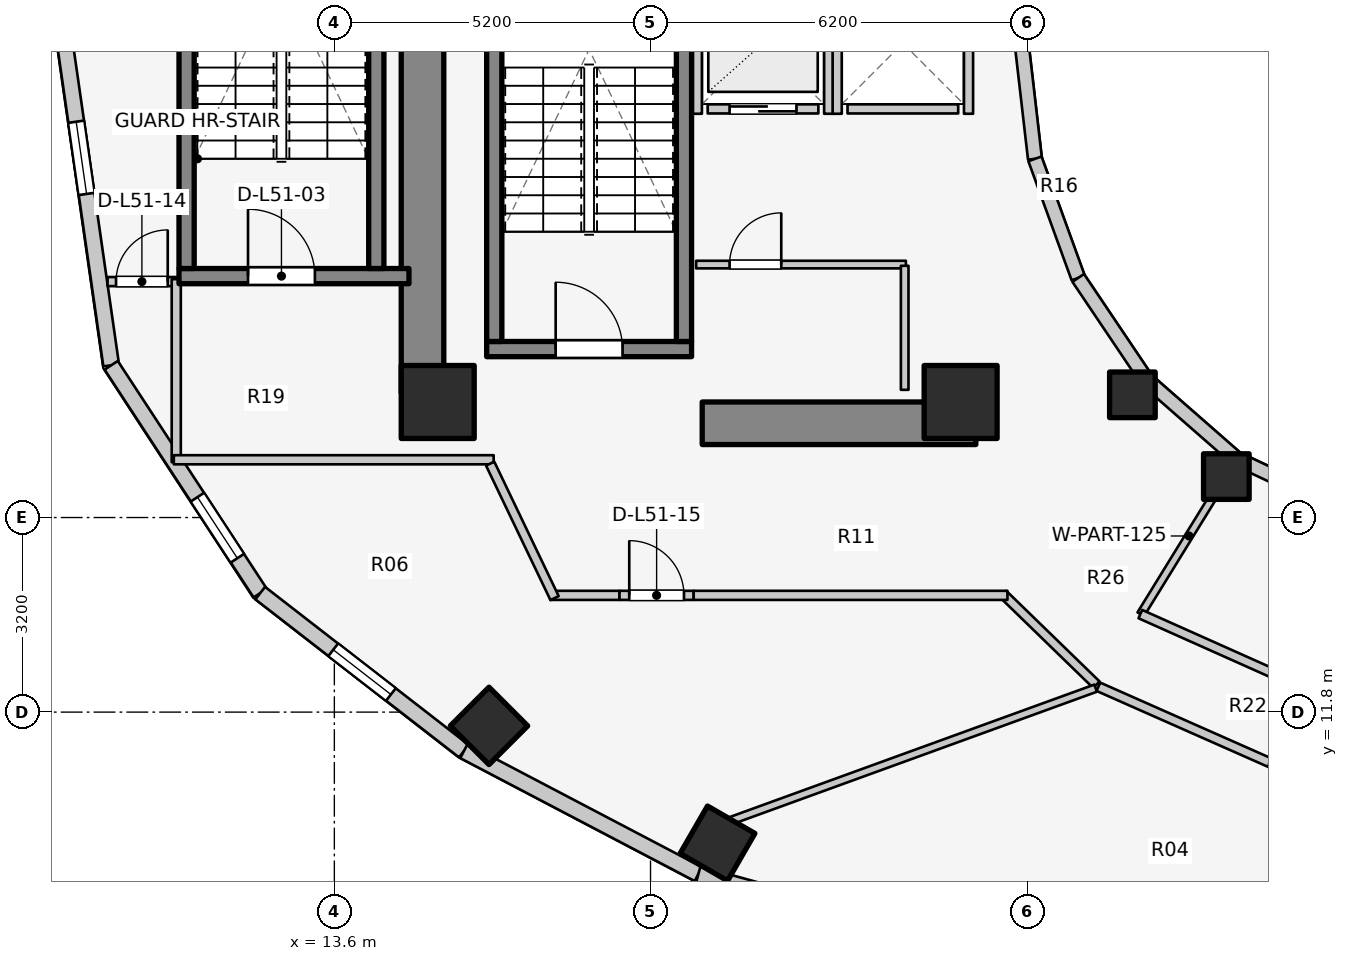
"""IFC4 building model, lengths in metres.
Left out: names, types, materials, properties, quantities, classifications, styles, units other than length and angle.
Written with IfcOpenShell. Run it as: python <this file> out.ifc"""

import sys

from ifc_helpers import new_model, si_unit, direction, frame, frame_2d, origin, origin_2d, place, context, subcontext, project, spatial, rectangle, extrude, element, fill, save


model = new_model("IFC4")
c1 = context("Model", 3, precision=1e-05, world=origin(), true_north=direction((0.0, 1.0)))
c2 = subcontext(c1, "Body", "Model", "MODEL_VIEW")
j1 = project(units=[si_unit("LENGTHUNIT", "METRE"), si_unit("PLANEANGLEUNIT", "RADIAN")], contexts=[c1])
p1 = place(None, origin())
s1 = spatial("IfcSite", under=j1, at=p1, CompositionType="ELEMENT")
p2 = place(p1, origin())
s2 = spatial("IfcBuilding", under=s1, at=p2, CompositionType="ELEMENT")
p3 = place(p2, frame((0.0, 0.0, 168.4)))
s3 = spatial("IfcBuildingStorey", under=s2, at=p3, CompositionType="ELEMENT", Elevation=168.4)
p4 = place(p3, frame((15.05, 17.05, 0.0), z_axis=(0.0, 0.0, 1.0), x_axis=(0.0, 1.0, 0.0)))
e1 = element("IfcWall", 1, at=p4, inside=s3, PredefinedType="SHEAR", context=c2, shape_type="SweptSolid", body=[
    extrude(rectangle(XDim=12.8, YDim=0.7, at=frame_2d((6.4, 0.0))), origin(), (0.0, 0.0, 1.0), 3.1),
])
p5 = place(p3, frame((19.65, 16.55, 0.0), z_axis=(0.0, 0.0, 1.0), x_axis=(1.0, 0.0, 0.0)))
e2 = element("IfcWall", 2, at=p5, inside=s3, PredefinedType="SHEAR", context=c2, shape_type="SweptSolid", body=[
    extrude(rectangle(XDim=4.5, YDim=0.7, at=frame_2d((2.25, 0.0))), origin(), (0.0, 0.0, 1.0), 3.1),
])
p6 = place(p3, frame((16.105, 17.77, 0.0), z_axis=(0.0, 0.0, 1.0), x_axis=(1.0, 0.0, 0.0)))
e3 = element("IfcWall", 3, at=p6, inside=s3, PredefinedType="SOLIDWALL", context=c2, shape_type="SweptSolid", body=[
    extrude(rectangle(XDim=3.37, YDim=0.25, at=frame_2d((1.685, 0.0))), origin(), (0.0, 0.0, 1.0), 3.1),
])
p7 = place(p6, frame((1.135, 0.0, 0.0)))
e4 = element("IfcOpeningElement", 4, at=p7, cuts=e3, PredefinedType="OPENING", context=c2, shape_type="SweptSolid", body=[
    extrude(rectangle(XDim=1.1, YDim=2.1, at=frame_2d((0.55, 1.05))), frame((0.0, 0.135, 0.0), z_axis=(0.0, -1.0, 0.0), x_axis=(1.0, 0.0, 0.0)), (0.0, 0.0, 1.0), 0.27),
])
for number, where, z_axis, x_axis in (
    (5, (16.23, 17.895, 0.0), (0.0, 0.0, 1.0), (0.0, 1.0, 0.0)),
    (6, (19.35, 17.895, 0.0), (0.0, 0.0, 1.0), (0.0, 1.0, 0.0)),
):
    element("IfcWall", number, at=place(p3, frame(where, z_axis=z_axis, x_axis=x_axis)), inside=s3, PredefinedType="SOLIDWALL", context=c2, shape_type="SweptSolid", body=[
        extrude(rectangle(XDim=7.81, YDim=0.25, at=frame_2d((3.905, 0.0))), origin(), (0.0, 0.0, 1.0), 3.1),
    ])
p8 = place(p3, frame((11.045, 18.97, 0.0), z_axis=(0.0, 0.0, 1.0), x_axis=(1.0, 0.0, 0.0)))
e7 = element("IfcWall", 7, at=p8, inside=s3, PredefinedType="SOLIDWALL", context=c2, shape_type="SweptSolid", body=[
    extrude(rectangle(XDim=3.782, YDim=0.25, at=frame_2d((1.891, 0.0))), origin(), (0.0, 0.0, 1.0), 3.1),
])
p9 = place(p8, frame((1.135, 0.0, 0.0)))
e8 = element("IfcOpeningElement", 8, at=p9, cuts=e7, PredefinedType="OPENING", context=c2, shape_type="SweptSolid", body=[
    extrude(rectangle(XDim=1.1, YDim=2.1, at=frame_2d((0.55, 1.05))), frame((0.0, 0.135, 0.0), z_axis=(0.0, -1.0, 0.0), x_axis=(1.0, 0.0, 0.0)), (0.0, 0.0, 1.0), 0.27),
])
for number, where, z_axis, x_axis in (
    (9, (11.17, 19.095, 0.0), (0.0, 0.0, 1.0), (0.0, 1.0, 0.0)),
    (10, (14.29, 19.095, 0.0), (0.0, 0.0, 1.0), (0.0, 1.0, 0.0)),
):
    element("IfcWall", number, at=place(p3, frame(where, z_axis=z_axis, x_axis=x_axis)), inside=s3, PredefinedType="SOLIDWALL", context=c2, shape_type="SweptSolid", body=[
        extrude(rectangle(XDim=7.81, YDim=0.25, at=frame_2d((3.905, 0.0))), origin(), (0.0, 0.0, 1.0), 3.1),
    ])
for number, where, z_axis, x_axis in (
    (11, (15.3, 16.9, 0.0), (0.0, 0.0, 1.0), (1.0, 0.0, 0.0)),
    (12, (23.9, 16.9, 0.0), (0.0, 0.0, 1.0), (1.0, 0.0, 0.0)),
):
    element("IfcColumn", number, at=place(p3, frame(where, z_axis=z_axis, x_axis=x_axis)), inside=s3, PredefinedType="COLUMN", context=c2, shape_type="SweptSolid", body=[
        extrude(rectangle(XDim=1.2, YDim=1.2, at=origin_2d()), origin(), (0.0, 0.0, 1.0), 3.1),
    ])
p10 = place(p3, frame((26.725, 17.018, 0.0), z_axis=(0.0, 0.0, 1.0), x_axis=(1.0, 0.0, 0.0)))
e13 = element("IfcColumn", 13, at=p10, inside=s3, PredefinedType="COLUMN", context=c2, shape_type="SweptSolid", body=[
    extrude(rectangle(XDim=0.75, YDim=0.75, at=origin_2d()), origin(), (0.0, 0.0, 1.0), 3.1),
])
p11 = place(p3, frame((16.143, 11.573, 0.0), z_axis=(0.0, 0.0, 1.0), x_axis=(-0.707106781187, -0.707106781187, 0.0)))
e14 = element("IfcColumn", 14, at=p11, inside=s3, PredefinedType="COLUMN", context=c2, shape_type="SweptSolid", body=[
    extrude(rectangle(XDim=0.9, YDim=0.9, at=origin_2d()), origin(), (0.0, 0.0, 1.0), 3.1),
])
p12 = place(p3, frame((28.27, 15.673, 0.0), z_axis=(0.0, 0.0, 1.0), x_axis=(1.0, 0.0, 0.0)))
e15 = element("IfcColumn", 15, at=p12, inside=s3, PredefinedType="COLUMN", context=c2, shape_type="SweptSolid", body=[
    extrude(rectangle(XDim=0.75, YDim=0.75, at=origin_2d()), origin(), (0.0, 0.0, 1.0), 3.1),
])
p13 = place(p3, frame((19.902, 9.641, 0.0), z_axis=(0.0, 0.0, 1.0), x_axis=(-0.5, -0.866025403784, 0.0)))
e16 = element("IfcColumn", 16, at=p13, inside=s3, PredefinedType="COLUMN", context=c2, shape_type="SweptSolid", body=[
    extrude(rectangle(XDim=0.9, YDim=0.9, at=origin_2d()), origin(), (0.0, 0.0, 1.0), 3.1),
])
p14 = place(p3, frame((24.88, 23.0, 0.0), z_axis=(0.0, 0.0, 1.0), x_axis=(0.114711713601, -0.993398823617, 0.0)))
e17 = element("IfcWall", 17, at=p14, inside=s3, PredefinedType="STANDARD", context=c2, shape_type="SweptSolid", body=[
    extrude(rectangle(XDim=2.115, YDim=0.23, at=frame_2d((1.058, 0.0))), origin(), (0.0, 0.0, 1.0), 2.56),
])
p15 = place(p3, frame((25.123, 20.898, 0.0), z_axis=(0.0, 0.0, 1.0), x_axis=(0.341423187295, -0.93990968033, 0.0)))
e18 = element("IfcWall", 18, at=p15, inside=s3, PredefinedType="STANDARD", context=c2, shape_type="SweptSolid", body=[
    extrude(rectangle(XDim=2.084, YDim=0.23, at=frame_2d((1.042, 0.0))), origin(), (0.0, 0.0, 1.0), 2.56),
])
p16 = place(p3, frame((25.834, 18.94, 0.0), z_axis=(0.0, 0.0, 1.0), x_axis=(0.558197800898, -0.829707909492, 0.0)))
e19 = element("IfcWall", 19, at=p16, inside=s3, PredefinedType="STANDARD", context=c2, shape_type="SweptSolid", body=[
    extrude(rectangle(XDim=2.027, YDim=0.23, at=frame_2d((1.013, 0.0))), origin(), (0.0, 0.0, 1.0), 1.22),
])
p17 = place(p3, frame((26.965, 17.258, 0.0), z_axis=(0.0, 0.0, 1.0), x_axis=(0.752576694707, -0.658504607869, 0.0)))
e20 = element("IfcWall", 20, at=p17, inside=s3, PredefinedType="STANDARD", context=c2, shape_type="SweptSolid", body=[
    extrude(rectangle(XDim=1.959, YDim=0.23, at=frame_2d((0.98, 0.0))), origin(), (0.0, 0.0, 1.0), 1.22),
])
p18 = place(p3, frame((28.44, 15.968, 0.0), z_axis=(0.0, 0.0, 1.0), x_axis=(0.904179699603, -0.427152280606, 0.0)))
e21 = element("IfcWall", 21, at=p18, inside=s3, PredefinedType="STANDARD", context=c2, shape_type="SweptSolid", body=[
    extrude(rectangle(XDim=1.899, YDim=0.23, at=frame_2d((0.95, 0.0))), origin(), (0.0, 0.0, 1.0), 1.22),
])
p19 = place(p3, frame((9.14, 23.0, 0.0), z_axis=(0.0, 0.0, 1.0), x_axis=(0.142227632286, -0.989833976288, 0.0)))
e22 = element("IfcWall", 22, at=p19, inside=s3, PredefinedType="STANDARD", context=c2, shape_type="SweptSolid", body=[
    extrude(rectangle(XDim=5.553, YDim=0.26, at=frame_2d((2.776, 0.0))), origin(), (0.0, 0.0, 1.0), 2.57),
])
p20 = place(p19, frame((1.506, 0.0, 0.75)))
e23 = element("IfcOpeningElement", 23, at=p20, cuts=e22, PredefinedType="OPENING", context=c2, shape_type="SweptSolid", body=[
    extrude(rectangle(XDim=1.2, YDim=1.5, at=frame_2d((0.6, 0.75))), frame((0.0, 0.14, 0.0), z_axis=(0.0, -1.0, 0.0), x_axis=(1.0, 0.0, 0.0)), (0.0, 0.0, 1.0), 0.28),
])
p21 = place(p3, frame((9.93, 17.503, 0.0), z_axis=(0.0, 0.0, 1.0), x_axis=(0.547456494366, -0.836834145322, 0.0)))
e24 = element("IfcWall", 24, at=p21, inside=s3, PredefinedType="STANDARD", context=c2, shape_type="SweptSolid", body=[
    extrude(rectangle(XDim=4.477, YDim=0.26, at=frame_2d((2.239, 0.0))), origin(), (0.0, 0.0, 1.0), 1.22),
])
p22 = place(p21, frame((2.591, 0.0, 0.15)))
e25 = element("IfcOpeningElement", 25, at=p22, cuts=e24, PredefinedType="OPENING", context=c2, shape_type="SweptSolid", body=[
    extrude(rectangle(XDim=1.2, YDim=0.9, at=frame_2d((0.6, 0.45))), frame((0.0, 0.14, 0.0), z_axis=(0.0, -1.0, 0.0), x_axis=(1.0, 0.0, 0.0)), (0.0, 0.0, 1.0), 0.28),
])
p23 = place(p3, frame((12.381, 13.757, 0.0), z_axis=(0.0, 0.0, 1.0), x_axis=(0.790185650662, -0.612867552973, 0.0)))
e26 = element("IfcWall", 26, at=p23, inside=s3, PredefinedType="STANDARD", context=c2, shape_type="SweptSolid", body=[
    extrude(rectangle(XDim=4.239, YDim=0.26, at=frame_2d((2.12, 0.0))), origin(), (0.0, 0.0, 1.0), 1.22),
])
p24 = place(p23, frame((1.52, 0.0, 0.15)))
e27 = element("IfcOpeningElement", 27, at=p24, cuts=e26, PredefinedType="OPENING", context=c2, shape_type="SweptSolid", body=[
    extrude(rectangle(XDim=1.2, YDim=0.9, at=frame_2d((0.6, 0.45))), frame((0.0, 0.14, 0.0), z_axis=(0.0, -1.0, 0.0), x_axis=(1.0, 0.0, 0.0)), (0.0, 0.0, 1.0), 0.28),
])
p25 = place(p3, frame((15.731, 11.158, 0.0), z_axis=(0.0, 0.0, 1.0), x_axis=(0.885660265226, -0.464333818065, 0.0)))
e28 = element("IfcWall", 28, at=p25, inside=s3, PredefinedType="STANDARD", context=c2, shape_type="SweptSolid", body=[
    extrude(rectangle(XDim=4.354, YDim=0.26, at=frame_2d((2.177, 0.0))), origin(), (0.0, 0.0, 1.0), 1.22),
])
p26 = place(p3, frame((19.587, 9.137, 0.0), z_axis=(0.0, 0.0, 1.0), x_axis=(0.963953455704, -0.26607092144, 0.0)))
e29 = element("IfcWall", 29, at=p26, inside=s3, PredefinedType="STANDARD", context=c2, shape_type="SweptSolid", body=[
    extrude(rectangle(XDim=5.237, YDim=0.26, at=frame_2d((2.618, 0.0))), origin(), (0.0, 0.0, 1.0), 1.22),
])
p27 = place(p26, frame((2.018, 0.0, 0.15)))
e30 = element("IfcOpeningElement", 30, at=p27, cuts=e29, PredefinedType="OPENING", context=c2, shape_type="SweptSolid", body=[
    extrude(rectangle(XDim=1.2, YDim=0.9, at=frame_2d((0.6, 0.45))), frame((0.0, 0.14, 0.0), z_axis=(0.0, -1.0, 0.0), x_axis=(1.0, 0.0, 0.0)), (0.0, 0.0, 1.0), 0.28),
])
p28 = place(p3, frame((19.74, 21.72, 0.0), z_axis=(0.0, 0.0, 1.0), x_axis=(1.0, 0.0, 0.0)))
e31 = element("IfcWall", 31, at=p28, inside=s3, PredefinedType="SOLIDWALL", context=c2, shape_type="SweptSolid", body=[
    extrude(rectangle(XDim=1.82, YDim=0.15, at=frame_2d((0.91, 0.0))), origin(), (0.0, 0.0, 1.0), 2.575),
])
p29 = place(p28, frame((0.36, 0.0, 0.0)))
e32 = element("IfcOpeningElement", 32, at=p29, cuts=e31, PredefinedType="OPENING", context=c2, shape_type="SweptSolid", body=[
    extrude(rectangle(XDim=1.1, YDim=2.1, at=frame_2d((0.55, 1.05))), frame((0.0, 0.085, 0.0), z_axis=(0.0, -1.0, 0.0), x_axis=(1.0, 0.0, 0.0)), (0.0, 0.0, 1.0), 0.17),
])
for number, where, z_axis, x_axis in (
    (33, (19.57, 21.64, 0.0), (0.0, 0.0, 1.0), (0.0, 1.0, 0.0)),
    (34, (21.73, 21.64, 0.0), (0.0, 0.0, 1.0), (0.0, 1.0, 0.0)),
):
    element("IfcWall", number, at=place(p3, frame(where, z_axis=z_axis, x_axis=x_axis)), inside=s3, PredefinedType="SOLIDWALL", context=c2, shape_type="SweptSolid", body=[
        extrude(rectangle(XDim=2.32, YDim=0.15, at=frame_2d((1.16, 0.0))), origin(), (0.0, 0.0, 1.0), 2.575),
    ])
p30 = place(p3, frame((22.04, 21.72, 0.0), z_axis=(0.0, 0.0, 1.0), x_axis=(1.0, 0.0, 0.0)))
e35 = element("IfcWall", 35, at=p30, inside=s3, PredefinedType="SOLIDWALL", context=c2, shape_type="SweptSolid", body=[
    extrude(rectangle(XDim=1.82, YDim=0.15, at=frame_2d((0.91, 0.0))), origin(), (0.0, 0.0, 1.0), 2.12),
])
p31 = place(p3, frame((21.87, 21.64, 0.0), z_axis=(0.0, 0.0, 1.0), x_axis=(0.0, 1.0, 0.0)))
e36 = element("IfcWall", 36, at=p31, inside=s3, PredefinedType="SOLIDWALL", context=c2, shape_type="SweptSolid", body=[
    extrude(rectangle(XDim=2.32, YDim=0.15, at=frame_2d((1.16, 0.0))), origin(), (0.0, 0.0, 1.0), 2.575),
])
p32 = place(p3, frame((24.03, 21.64, 0.0), z_axis=(0.0, 0.0, 1.0), x_axis=(0.0, 1.0, 0.0)))
e37 = element("IfcWall", 37, at=p32, inside=s3, PredefinedType="SOLIDWALL", context=c2, shape_type="SweptSolid", body=[
    extrude(rectangle(XDim=2.32, YDim=0.15, at=frame_2d((1.16, 0.0))), origin(), (0.0, 0.0, 1.0), 2.12),
])
p33 = place(p3, frame((19.55, 19.16, 0.0), z_axis=(0.0, 0.0, 1.0), x_axis=(1.0, 0.0, 0.0)))
e38 = element("IfcWall", 38, at=p33, inside=s3, PredefinedType="PARTITIONING", context=c2, shape_type="SweptSolid", body=[
    extrude(rectangle(XDim=3.45, YDim=0.125, at=frame_2d((1.725, 0.0))), origin(), (0.0, 0.0, 1.0), 2.12),
])
p34 = place(p33, frame((0.55, 0.0, 0.0)))
e39 = element("IfcOpeningElement", 39, at=p34, cuts=e38, PredefinedType="OPENING", context=c2, shape_type="SweptSolid", body=[
    extrude(rectangle(XDim=0.85, YDim=2.05, at=frame_2d((0.425, 1.025))), frame((0.0, 0.073, 0.0), z_axis=(0.0, -1.0, 0.0), x_axis=(1.0, 0.0, 0.0)), (0.0, 0.0, 1.0), 0.145),
])
p35 = place(p3, frame((22.98, 17.1, 0.0), z_axis=(0.0, 0.0, 1.0), x_axis=(0.0, 1.0, 0.0)))
e40 = element("IfcWall", 40, at=p35, inside=s3, PredefinedType="PARTITIONING", context=c2, shape_type="SweptSolid", body=[
    extrude(rectangle(XDim=2.04, YDim=0.125, at=frame_2d((1.02, 0.0))), origin(), (0.0, 0.0, 1.0), 2.575),
])
p36 = place(p3, frame((9.87, 18.88, 0.0), z_axis=(0.0, 0.0, 1.0), x_axis=(1.0, 0.0, 0.0)))
e41 = element("IfcWall", 41, at=p36, inside=s3, PredefinedType="PARTITIONING", context=c2, shape_type="SweptSolid", body=[
    extrude(rectangle(XDim=1.17, YDim=0.15, at=frame_2d((0.585, 0.0))), origin(), (0.0, 0.0, 1.0), 2.575),
])
p37 = place(p36, frame((0.14, 0.0, 0.0)))
e42 = element("IfcOpeningElement", 42, at=p37, cuts=e41, PredefinedType="OPENING", context=c2, shape_type="SweptSolid", body=[
    extrude(rectangle(XDim=0.85, YDim=2.05, at=frame_2d((0.425, 1.025))), frame((0.0, 0.085, 0.0), z_axis=(0.0, -1.0, 0.0), x_axis=(1.0, 0.0, 0.0)), (0.0, 0.0, 1.0), 0.17),
])
p38 = place(p3, frame((11.0, 15.91, 0.0), z_axis=(0.0, 0.0, 1.0), x_axis=(0.0, 1.0, 0.0)))
e43 = element("IfcWall", 43, at=p38, inside=s3, PredefinedType="PARTITIONING", context=c2, shape_type="SweptSolid", body=[
    extrude(rectangle(XDim=3.01, YDim=0.15, at=frame_2d((1.505, 0.0))), origin(), (0.0, 0.0, 1.0), 2.575),
])
p39 = place(p3, frame((10.96, 15.95, 0.0), z_axis=(0.0, 0.0, 1.0), x_axis=(1.0, 0.0, 0.0)))
e44 = element("IfcWall", 44, at=p39, inside=s3, PredefinedType="PARTITIONING", context=c2, shape_type="SweptSolid", body=[
    extrude(rectangle(XDim=5.26, YDim=0.15, at=frame_2d((2.63, 0.0))), origin(), (0.0, 0.0, 1.0), 1.22),
])
p40 = place(p3, frame((26.133, 12.251, 0.0), z_axis=(0.0, 0.0, 1.0), x_axis=(-0.717419568599, 0.696641344302, 0.0)))
e45 = element("IfcWall", 45, at=p40, inside=s3, PredefinedType="PARTITIONING", context=c2, shape_type="SweptSolid", body=[
    extrude(rectangle(XDim=2.138, YDim=0.15, at=frame_2d((1.069, 0.0))), origin(), (0.0, 0.0, 1.0), 1.22),
])
p41 = place(p3, frame((17.15, 13.72, 0.0), z_axis=(0.0, 0.0, 1.0), x_axis=(1.0, 0.0, 0.0)))
e46 = element("IfcWall", 46, at=p41, inside=s3, PredefinedType="PARTITIONING", context=c2, shape_type="SweptSolid", body=[
    extrude(rectangle(XDim=1.14, YDim=0.15, at=frame_2d((0.57, 0.0))), origin(), (0.0, 0.0, 1.0), 2.575),
])
p42 = place(p3, frame((18.29, 13.72, 0.0), z_axis=(0.0, 0.0, 1.0), x_axis=(1.0, 0.0, 0.0)))
e47 = element("IfcWall", 47, at=p42, inside=s3, PredefinedType="PARTITIONING", context=c2, shape_type="SweptSolid", body=[
    extrude(rectangle(XDim=1.22, YDim=0.15, at=frame_2d((0.61, 0.0))), origin(), (0.0, 0.0, 1.0), 2.16),
])
p43 = place(p42, frame((0.16, 0.0, 0.0)))
e48 = element("IfcOpeningElement", 48, at=p43, cuts=e47, PredefinedType="OPENING", context=c2, shape_type="SweptSolid", body=[
    extrude(rectangle(XDim=0.9, YDim=2.1, at=frame_2d((0.45, 1.05))), frame((0.0, 0.085, 0.0), z_axis=(0.0, -1.0, 0.0), x_axis=(1.0, 0.0, 0.0)), (0.0, 0.0, 1.0), 0.17),
])
p44 = place(p3, frame((19.51, 13.72, 0.0), z_axis=(0.0, 0.0, 1.0), x_axis=(1.0, 0.0, 0.0)))
e49 = element("IfcWall", 49, at=p44, inside=s3, PredefinedType="PARTITIONING", context=c2, shape_type="SweptSolid", body=[
    extrude(rectangle(XDim=5.16, YDim=0.15, at=frame_2d((2.58, 0.0))), origin(), (0.0, 0.0, 1.0), 1.22),
])
p45 = place(p3, frame((17.222, 13.675, 0.0), z_axis=(0.0, 0.0, 1.0), x_axis=(-0.431973389813, 0.901886351207, 0.0)))
e50 = element("IfcWall", 50, at=p45, inside=s3, PredefinedType="PARTITIONING", context=c2, shape_type="SweptSolid", body=[
    extrude(rectangle(XDim=2.452, YDim=0.15, at=frame_2d((1.226, 0.0))), origin(), (0.0, 0.0, 1.0), 2.575),
])
p46 = place(p3, frame((28.45, 15.985, 0.0), z_axis=(0.0, 0.0, 1.0), x_axis=(-0.524565340045, -0.851370192116, 0.0)))
e51 = element("IfcWall", 51, at=p46, inside=s3, PredefinedType="PARTITIONING", context=c2, shape_type="SweptSolid", body=[
    extrude(rectangle(XDim=3.027, YDim=0.125, at=frame_2d((1.514, 0.0))), origin(), (0.0, 0.0, 1.0), 1.22),
])
p47 = place(p3, frame((26.856, 13.412, 0.0), z_axis=(0.0, 0.0, 1.0), x_axis=(0.912985265053, -0.407992531545, 0.0)))
e52 = element("IfcWall", 52, at=p47, inside=s3, PredefinedType="PARTITIONING", context=c2, shape_type="SweptSolid", body=[
    extrude(rectangle(XDim=2.723, YDim=0.15, at=frame_2d((1.362, 0.0))), origin(), (0.0, 0.0, 1.0), 1.22),
])
p48 = place(p3, frame((26.12, 12.194, 0.0), z_axis=(0.0, 0.0, 1.0), x_axis=(-0.939901628116, -0.341445353557, 0.0)))
e53 = element("IfcWall", 53, at=p48, inside=s3, PredefinedType="PARTITIONING", context=c2, shape_type="SweptSolid", body=[
    extrude(rectangle(XDim=6.387, YDim=0.125, at=frame_2d((3.194, 0.0))), origin(), (0.0, 0.0, 1.0), 1.22),
])
p49 = place(p3, frame((26.165, 12.217, 0.0), z_axis=(0.0, 0.0, 1.0), x_axis=(0.91445214467, -0.404694051239, 0.0)))
e54 = element("IfcWall", 54, at=p49, inside=s3, PredefinedType="PARTITIONING", context=c2, shape_type="SweptSolid", body=[
    extrude(rectangle(XDim=3.091, YDim=0.15, at=frame_2d((1.545, 0.0))), origin(), (0.0, 0.0, 1.0), 1.22),
])
p50 = place(p20, origin())
e55 = element("IfcWindow", 55, at=p50, inside=s3, PartitioningType="SINGLE_PANEL", PredefinedType="WINDOW", context=c2, shape_type="SweptSolid", body=[
    extrude(rectangle(XDim=1.2, YDim=1.5, at=frame_2d((0.6, 0.75))), frame((0.0, 0.03, 0.0), z_axis=(0.0, -1.0, 0.0), x_axis=(1.0, 0.0, 0.0)), (0.0, 0.0, 1.0), 0.06),
])
fill(e23, e55)
p51 = place(p22, origin())
e56 = element("IfcWindow", 56, at=p51, inside=s3, PartitioningType="SINGLE_PANEL", PredefinedType="WINDOW", context=c2, shape_type="SweptSolid", body=[
    extrude(rectangle(XDim=1.2, YDim=0.9, at=frame_2d((0.6, 0.45))), frame((0.0, 0.03, 0.0), z_axis=(0.0, -1.0, 0.0), x_axis=(1.0, 0.0, 0.0)), (0.0, 0.0, 1.0), 0.06),
])
fill(e25, e56)
p52 = place(p24, origin())
e57 = element("IfcWindow", 57, at=p52, inside=s3, PartitioningType="SINGLE_PANEL", PredefinedType="WINDOW", context=c2, shape_type="SweptSolid", body=[
    extrude(rectangle(XDim=1.2, YDim=0.9, at=frame_2d((0.6, 0.45))), frame((0.0, 0.03, 0.0), z_axis=(0.0, -1.0, 0.0), x_axis=(1.0, 0.0, 0.0)), (0.0, 0.0, 1.0), 0.06),
])
fill(e27, e57)
p53 = place(p7, origin())
e58 = element("IfcDoor", 58, at=p53, inside=s3, OperationType="SINGLE_SWING_LEFT", PredefinedType="DOOR", context=c2, shape_type="SweptSolid", body=[
    extrude(rectangle(XDim=1.1, YDim=2.1, at=frame_2d((0.55, 1.05))), frame((0.0, 0.025, 0.0), z_axis=(0.0, -1.0, 0.0), x_axis=(1.0, 0.0, 0.0)), (0.0, 0.0, 1.0), 0.05),
])
fill(e4, e58)
p54 = place(p9, origin())
e59 = element("IfcDoor", 59, at=p54, inside=s3, OperationType="SINGLE_SWING_LEFT", PredefinedType="DOOR", context=c2, shape_type="SweptSolid", body=[
    extrude(rectangle(XDim=1.1, YDim=2.1, at=frame_2d((0.55, 1.05))), frame((0.0, 0.025, 0.0), z_axis=(0.0, -1.0, 0.0), x_axis=(1.0, 0.0, 0.0)), (0.0, 0.0, 1.0), 0.05),
])
fill(e8, e59)
p55 = place(p29, origin())
e60 = element("IfcDoor", 60, at=p55, inside=s3, OperationType="DOUBLE_DOOR_SLIDING", PredefinedType="DOOR", context=c2, shape_type="SweptSolid", body=[
    extrude(rectangle(XDim=1.1, YDim=2.1, at=frame_2d((0.55, 1.05))), frame((0.0, 0.025, 0.0), z_axis=(0.0, -1.0, 0.0), x_axis=(1.0, 0.0, 0.0)), (0.0, 0.0, 1.0), 0.05),
])
fill(e32, e60)
p56 = place(p34, origin())
e61 = element("IfcDoor", 61, at=p56, inside=s3, OperationType="SINGLE_SWING_RIGHT", PredefinedType="DOOR", context=c2, shape_type="SweptSolid", body=[
    extrude(rectangle(XDim=0.85, YDim=2.05, at=frame_2d((0.425, 1.025))), frame((0.0, 0.025, 0.0), z_axis=(0.0, -1.0, 0.0), x_axis=(1.0, 0.0, 0.0)), (0.0, 0.0, 1.0), 0.05),
])
fill(e39, e61)
p57 = place(p37, origin())
e62 = element("IfcDoor", 62, at=p57, inside=s3, OperationType="SINGLE_SWING_RIGHT", PredefinedType="DOOR", context=c2, shape_type="SweptSolid", body=[
    extrude(rectangle(XDim=0.85, YDim=2.05, at=frame_2d((0.425, 1.025))), frame((0.0, 0.025, 0.0), z_axis=(0.0, -1.0, 0.0), x_axis=(1.0, 0.0, 0.0)), (0.0, 0.0, 1.0), 0.05),
])
fill(e42, e62)
p58 = place(p43, origin())
e63 = element("IfcDoor", 63, at=p58, inside=s3, OperationType="SINGLE_SWING_LEFT", PredefinedType="DOOR", context=c2, shape_type="SweptSolid", body=[
    extrude(rectangle(XDim=0.9, YDim=2.1, at=frame_2d((0.45, 1.05))), frame((0.0, 0.025, 0.0), z_axis=(0.0, -1.0, 0.0), x_axis=(1.0, 0.0, 0.0)), (0.0, 0.0, 1.0), 0.05),
])
fill(e48, e63)
save(model, sys.argv[1])
